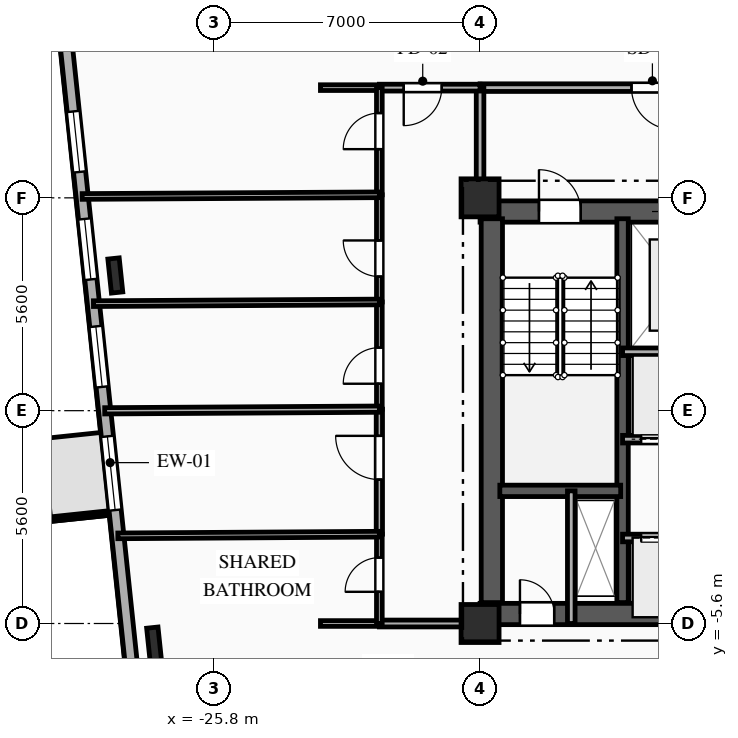
"""IFC4 building model, lengths in metres.
Left out: names, types, materials, properties, quantities, classifications, styles, units other than length and angle.
Written with IfcOpenShell. Run it as: python <this file> out.ifc"""

import sys

from ifc_helpers import new_model, si_unit, direction, frame, frame_2d, origin, origin_2d, place, context, subcontext, project, spatial, rectangle, i_section, extrude, element, fill, save


model = new_model("IFC4")
c1 = context("Model", 3, precision=1e-05, world=origin(), true_north=direction((0.0, 1.0)))
c2 = subcontext(c1, "Body", "Model", "MODEL_VIEW")
j1 = project(units=[si_unit("LENGTHUNIT", "METRE"), si_unit("PLANEANGLEUNIT", "RADIAN")], contexts=[c1])
p1 = place(None, origin())
s1 = spatial("IfcSite", under=j1, at=p1, CompositionType="ELEMENT")
p2 = place(p1, origin())
s2 = spatial("IfcBuilding", under=s1, at=p2, CompositionType="ELEMENT")
p3 = place(p2, frame((0.0, 0.0, 99.1)))
s3 = spatial("IfcBuildingStorey", under=s2, at=p3, CompositionType="ELEMENT", Elevation=99.1)
for number, where, z_axis, x_axis in (
    (1, (-18.8, -5.6, 0.0), (0.0, 0.0, 1.0), (1.0, 0.0, 0.0)),
    (2, (-18.8, 5.6, 0.0), (0.0, 0.0, 1.0), (1.0, 0.0, 0.0)),
):
    element("IfcColumn", number, at=place(p3, frame(where, z_axis=z_axis, x_axis=x_axis)), inside=s3, PredefinedType="COLUMN", context=c2, shape_type="SweptSolid", body=[
        extrude(rectangle(XDim=1.0, YDim=1.0, at=origin_2d()), origin(), (0.0, 0.0, 1.0), 3.35),
    ])
for number, where, z_axis, x_axis in (
    (3, (-28.398, 3.557, 0.0), (0.0, 0.0, 1.0), (0.995, 0.105, 0.0)),
    (4, (-27.377, -6.156, 0.0), (0.0, 0.0, 1.0), (0.995, 0.105, 0.0)),
):
    element("IfcColumn", number, at=place(p3, frame(where, z_axis=z_axis, x_axis=x_axis)), inside=s3, PredefinedType="COLUMN", context=c2, shape_type="SweptSolid", body=[
        extrude(i_section(OverallWidth=0.3, OverallDepth=0.9, WebThickness=0.019, FlangeThickness=0.035, FilletRadius=0.03, at=origin_2d()), origin(), (0.0, 0.0, 1.0), 3.35),
    ])
p4 = place(p3, frame((-26.935, -16.583, 0.0), z_axis=(0.0, 0.0, 1.0), x_axis=(-0.104524887486, 0.994522271192, 0.0)))
e5 = element("IfcWall", 5, at=p4, inside=s3, PredefinedType="SOLIDWALL", context=c2, shape_type="SweptSolid", body=[
    extrude(rectangle(XDim=30.6, YDim=0.32, at=frame_2d((15.3, 0.0))), origin(), (0.0, 0.0, 1.0), 3.045),
])
p5 = place(p4, frame((14.045, 0.0, 0.85)))
e6 = element("IfcOpeningElement", 6, at=p5, cuts=e5, PredefinedType="OPENING", context=c2, shape_type="SweptSolid", body=[
    extrude(rectangle(XDim=1.95, YDim=1.85, at=frame_2d((0.975, 0.925))), frame((0.0, 0.17, 0.0), z_axis=(0.0, -1.0, 0.0), x_axis=(1.0, 0.0, 0.0)), (0.0, 0.0, 1.0), 0.34),
])
p6 = place(p4, frame((17.304, 0.0, 0.85)))
e7 = element("IfcOpeningElement", 7, at=p6, cuts=e5, PredefinedType="OPENING", context=c2, shape_type="SweptSolid", body=[
    extrude(rectangle(XDim=1.6, YDim=1.85, at=frame_2d((0.8, 0.925))), frame((0.0, 0.17, 0.0), z_axis=(0.0, -1.0, 0.0), x_axis=(1.0, 0.0, 0.0)), (0.0, 0.0, 1.0), 0.34),
])
p7 = place(p4, frame((20.147, 0.0, 0.85)))
e8 = element("IfcOpeningElement", 8, at=p7, cuts=e5, PredefinedType="OPENING", context=c2, shape_type="SweptSolid", body=[
    extrude(rectangle(XDim=1.6, YDim=1.85, at=frame_2d((0.8, 0.925))), frame((0.0, 0.17, 0.0), z_axis=(0.0, -1.0, 0.0), x_axis=(1.0, 0.0, 0.0)), (0.0, 0.0, 1.0), 0.34),
])
p8 = place(p4, frame((22.991, 0.0, 0.85)))
e9 = element("IfcOpeningElement", 9, at=p8, cuts=e5, PredefinedType="OPENING", context=c2, shape_type="SweptSolid", body=[
    extrude(rectangle(XDim=1.6, YDim=1.85, at=frame_2d((0.8, 0.925))), frame((0.0, 0.17, 0.0), z_axis=(0.0, -1.0, 0.0), x_axis=(1.0, 0.0, 0.0)), (0.0, 0.0, 1.0), 0.34),
])
p9 = place(p3, frame((-18.8, 5.24, 0.0), z_axis=(0.0, 0.0, 1.0), x_axis=(1.0, 0.0, 0.0)))
e10 = element("IfcWall", 10, at=p9, inside=s3, PredefinedType="SHEAR", context=c2, shape_type="SweptSolid", body=[
    extrude(rectangle(XDim=9.6, YDim=0.56, at=frame_2d((4.8, 0.0))), origin(), (0.0, 0.0, 1.0), 3.045),
])
p10 = place(p9, frame((1.55, 0.0, 0.0)))
e11 = element("IfcOpeningElement", 11, at=p10, cuts=e10, PredefinedType="OPENING", context=c2, shape_type="SweptSolid", body=[
    extrude(rectangle(XDim=1.1, YDim=2.15, at=frame_2d((0.55, 1.075))), frame((0.0, 0.29, 0.0), z_axis=(0.0, -1.0, 0.0), x_axis=(1.0, 0.0, 0.0)), (0.0, 0.0, 1.0), 0.58),
])
p11 = place(p9, frame((4.775, 0.0, 0.0)))
e12 = element("IfcOpeningElement", 12, at=p11, cuts=e10, PredefinedType="OPENING", context=c2, shape_type="SweptSolid", body=[
    extrude(rectangle(XDim=1.05, YDim=2.1, at=frame_2d((0.525, 1.05))), frame((0.0, 0.29, 0.0), z_axis=(0.0, -1.0, 0.0), x_axis=(1.0, 0.0, 0.0)), (0.0, 0.0, 1.0), 0.58),
])
p12 = place(p3, frame((-18.8, -5.35, 0.0), z_axis=(0.0, 0.0, 1.0), x_axis=(1.0, 0.0, 0.0)))
e13 = element("IfcWall", 13, at=p12, inside=s3, PredefinedType="SHEAR", context=c2, shape_type="SweptSolid", body=[
    extrude(rectangle(XDim=9.6, YDim=0.56, at=frame_2d((4.8, 0.0))), origin(), (0.0, 0.0, 1.0), 3.045),
])
p13 = place(p12, frame((1.05, 0.0, 0.0)))
e14 = element("IfcOpeningElement", 14, at=p13, cuts=e13, PredefinedType="OPENING", context=c2, shape_type="SweptSolid", body=[
    extrude(rectangle(XDim=0.9, YDim=2.1, at=frame_2d((0.45, 1.05))), frame((0.0, 0.29, 0.0), z_axis=(0.0, -1.0, 0.0), x_axis=(1.0, 0.0, 0.0)), (0.0, 0.0, 1.0), 0.58),
])
p14 = place(p3, frame((-18.49, -5.05, 0.0), z_axis=(0.0, 0.0, 1.0), x_axis=(0.0, 1.0, 0.0)))
e15 = element("IfcWall", 15, at=p14, inside=s3, PredefinedType="SHEAR", context=c2, shape_type="SweptSolid", body=[
    extrude(rectangle(XDim=10.1, YDim=0.56, at=frame_2d((5.05, 0.0))), origin(), (0.0, 0.0, 1.0), 3.045),
])
p15 = place(p3, frame((-15.05, -5.05, 0.0), z_axis=(0.0, 0.0, 1.0), x_axis=(0.0, 1.0, 0.0)))
e16 = element("IfcWall", 16, at=p15, inside=s3, PredefinedType="SHEAR", context=c2, shape_type="SweptSolid", body=[
    extrude(rectangle(XDim=10.1, YDim=0.3, at=frame_2d((5.05, 0.0))), origin(), (0.0, 0.0, 1.0), 3.045),
])
p16 = place(p3, frame((-18.28, -2.11, 0.0), z_axis=(0.0, 0.0, 1.0), x_axis=(1.0, 0.0, 0.0)))
e17 = element("IfcWall", 17, at=p16, inside=s3, PredefinedType="SHEAR", context=c2, shape_type="SweptSolid", body=[
    extrude(rectangle(XDim=3.18, YDim=0.3, at=frame_2d((1.59, 0.0))), origin(), (0.0, 0.0, 1.0), 3.045),
])
p17 = place(p3, frame((-16.4, -5.6, 0.0), z_axis=(0.0, 0.0, 1.0), x_axis=(0.0, 1.0, 0.0)))
e18 = element("IfcWall", 18, at=p17, inside=s3, PredefinedType="PARTITIONING", context=c2, shape_type="SweptSolid", body=[
    extrude(rectangle(XDim=3.49, YDim=0.2, at=frame_2d((1.745, 0.0))), origin(), (0.0, 0.0, 1.0), 3.045),
])
p18 = place(p3, frame((-12.0, 8.5, 0.0), z_axis=(0.0, 0.0, 1.0), x_axis=(-1.0, 0.0, 0.0)))
e19 = element("IfcWall", 19, at=p18, inside=s3, PredefinedType="PARTITIONING", context=c2, shape_type="SweptSolid", body=[
    extrude(rectangle(XDim=6.8, YDim=0.2, at=frame_2d((3.4, 0.0))), origin(), (0.0, 0.0, 1.0), 3.045),
])
p19 = place(p18, frame((1.715, 0.0, 0.0)))
e20 = element("IfcOpeningElement", 20, at=p19, cuts=e19, PredefinedType="OPENING", context=c2, shape_type="SweptSolid", body=[
    extrude(rectangle(XDim=1.1, YDim=2.15, at=frame_2d((0.55, 1.075))), frame((0.0, 0.11, 0.0), z_axis=(0.0, -1.0, 0.0), x_axis=(1.0, 0.0, 0.0)), (0.0, 0.0, 1.0), 0.22),
])
p20 = place(p3, frame((-18.8, 8.5, 0.0), z_axis=(0.0, 0.0, 1.0), x_axis=(0.0, -1.0, 0.0)))
e21 = element("IfcWall", 21, at=p20, inside=s3, PredefinedType="PARTITIONING", context=c2, shape_type="SweptSolid", body=[
    extrude(rectangle(XDim=2.9, YDim=0.2, at=frame_2d((1.45, 0.0))), origin(), (0.0, 0.0, 1.0), 2.53),
])
p21 = place(p3, frame((-15.05, -3.35, 0.0), z_axis=(0.0, 0.0, 1.0), x_axis=(1.0, 0.0, 0.0)))
e22 = element("IfcWall", 22, at=p21, inside=s3, PredefinedType="PARTITIONING", context=c2, shape_type="SweptSolid", body=[
    extrude(rectangle(XDim=2.03, YDim=0.2, at=frame_2d((1.015, 0.0))), origin(), (0.0, 0.0, 1.0), 3.045),
])
p22 = place(p21, frame((0.49, 0.0, 0.0)))
e23 = element("IfcOpeningElement", 23, at=p22, cuts=e22, PredefinedType="OPENING", context=c2, shape_type="SweptSolid", body=[
    extrude(rectangle(XDim=1.05, YDim=2.1, at=frame_2d((0.525, 1.05))), frame((0.0, 0.11, 0.0), z_axis=(0.0, -1.0, 0.0), x_axis=(1.0, 0.0, 0.0)), (0.0, 0.0, 1.0), 0.22),
])
p23 = place(p3, frame((-13.02, -0.75, 0.0), z_axis=(0.0, 0.0, 1.0), x_axis=(-1.0, 0.0, 0.0)))
e24 = element("IfcWall", 24, at=p23, inside=s3, PredefinedType="PARTITIONING", context=c2, shape_type="SweptSolid", body=[
    extrude(rectangle(XDim=2.03, YDim=0.2, at=frame_2d((1.015, 0.0))), origin(), (0.0, 0.0, 1.0), 3.045),
])
p24 = place(p23, frame((0.49, 0.0, 0.0)))
e25 = element("IfcOpeningElement", 25, at=p24, cuts=e24, PredefinedType="OPENING", context=c2, shape_type="SweptSolid", body=[
    extrude(rectangle(XDim=1.05, YDim=2.1, at=frame_2d((0.525, 1.05))), frame((0.0, 0.11, 0.0), z_axis=(0.0, -1.0, 0.0), x_axis=(1.0, 0.0, 0.0)), (0.0, 0.0, 1.0), 0.22),
])
p25 = place(p3, frame((-18.8, 8.5, 0.0), z_axis=(0.0, 0.0, 1.0), x_axis=(-1.0, 0.0, 0.0)))
e26 = element("IfcWall", 26, at=p25, inside=s3, PredefinedType="PARTITIONING", context=c2, shape_type="SweptSolid", body=[
    extrude(rectangle(XDim=2.65, YDim=0.18, at=frame_2d((1.325, 0.0))), origin(), (0.0, 0.0, 1.0), 3.045),
])
p26 = place(p25, frame((1.009, 0.0, 0.0)))
e27 = element("IfcOpeningElement", 27, at=p26, cuts=e26, PredefinedType="OPENING", context=c2, shape_type="SweptSolid", body=[
    extrude(rectangle(XDim=1.0, YDim=2.15, at=frame_2d((0.5, 1.075))), frame((0.0, 0.1, 0.0), z_axis=(0.0, -1.0, 0.0), x_axis=(1.0, 0.0, 0.0)), (0.0, 0.0, 1.0), 0.2),
])
p27 = place(p3, frame((-21.45, 8.5, 0.0), z_axis=(0.0, 0.0, 1.0), x_axis=(-1.0, 0.0, 0.0)))
e28 = element("IfcWall", 28, at=p27, inside=s3, PredefinedType="PARTITIONING", context=c2, shape_type="SweptSolid", body=[
    extrude(rectangle(XDim=1.55, YDim=0.15, at=frame_2d((0.775, 0.0))), origin(), (0.0, 0.0, 1.0), 3.045),
])
p28 = place(p3, frame((-21.45, -5.6, 0.0), z_axis=(0.0, 0.0, 1.0), x_axis=(1.0, 0.0, 0.0)))
e29 = element("IfcWall", 29, at=p28, inside=s3, PredefinedType="PARTITIONING", context=c2, shape_type="SweptSolid", body=[
    extrude(rectangle(XDim=2.65, YDim=0.18, at=frame_2d((1.325, 0.0))), origin(), (0.0, 0.0, 1.0), 3.045),
])
p29 = place(p3, frame((-23.0, -5.6, 0.0), z_axis=(0.0, 0.0, 1.0), x_axis=(1.0, 0.0, 0.0)))
e30 = element("IfcWall", 30, at=p29, inside=s3, PredefinedType="PLUMBINGWALL", context=c2, shape_type="SweptSolid", body=[
    extrude(rectangle(XDim=1.55, YDim=0.15, at=frame_2d((0.775, 0.0))), origin(), (0.0, 0.0, 1.0), 3.045),
])
p30 = place(p3, frame((-21.45, -5.6, 0.0), z_axis=(0.0, 0.0, 1.0), x_axis=(0.0, 1.0, 0.0)))
e31 = element("IfcWall", 31, at=p30, inside=s3, PredefinedType="PLUMBINGWALL", context=c2, shape_type="SweptSolid", body=[
    extrude(rectangle(XDim=2.35, YDim=0.15, at=frame_2d((1.175, 0.0))), origin(), (0.0, 0.0, 1.0), 3.045),
])
p31 = place(p30, frame((0.834, 0.0, 0.0)))
e32 = element("IfcOpeningElement", 32, at=p31, cuts=e31, PredefinedType="OPENING", context=c2, shape_type="SweptSolid", body=[
    extrude(rectangle(XDim=0.9, YDim=2.1, at=frame_2d((0.45, 1.05))), frame((0.0, 0.085, 0.0), z_axis=(0.0, -1.0, 0.0), x_axis=(1.0, 0.0, 0.0)), (0.0, 0.0, 1.0), 0.17),
])
p32 = place(p3, frame((-21.45, -3.25, 0.0), z_axis=(0.0, 0.0, 1.0), x_axis=(0.0, 1.0, 0.0)))
e33 = element("IfcWall", 33, at=p32, inside=s3, PredefinedType="PARTITIONING", context=c2, shape_type="SweptSolid", body=[
    extrude(rectangle(XDim=3.29, YDim=0.165, at=frame_2d((1.645, 0.0))), origin(), (0.0, 0.0, 1.0), 3.045),
])
p33 = place(p32, frame((1.438, 0.0, 0.0)))
e34 = element("IfcOpeningElement", 34, at=p33, cuts=e33, PredefinedType="OPENING", context=c2, shape_type="SweptSolid", body=[
    extrude(rectangle(XDim=1.15, YDim=2.15, at=frame_2d((0.575, 1.075))), frame((0.0, 0.093, 0.0), z_axis=(0.0, -1.0, 0.0), x_axis=(1.0, 0.0, 0.0)), (0.0, 0.0, 1.0), 0.185),
])
p34 = place(p3, frame((-21.45, 0.04, 0.0), z_axis=(0.0, 0.0, 1.0), x_axis=(0.0, 1.0, 0.0)))
e35 = element("IfcWall", 35, at=p34, inside=s3, PredefinedType="PARTITIONING", context=c2, shape_type="SweptSolid", body=[
    extrude(rectangle(XDim=2.82, YDim=0.15, at=frame_2d((1.41, 0.0))), origin(), (0.0, 0.0, 1.0), 3.045),
])
p35 = place(p34, frame((0.669, 0.0, 0.0)))
e36 = element("IfcOpeningElement", 36, at=p35, cuts=e35, PredefinedType="OPENING", context=c2, shape_type="SweptSolid", body=[
    extrude(rectangle(XDim=0.95, YDim=2.1, at=frame_2d((0.475, 1.05))), frame((0.0, 0.085, 0.0), z_axis=(0.0, -1.0, 0.0), x_axis=(1.0, 0.0, 0.0)), (0.0, 0.0, 1.0), 0.17),
])
p36 = place(p3, frame((-21.45, 2.86, 0.0), z_axis=(0.0, 0.0, 1.0), x_axis=(0.0, 1.0, 0.0)))
e37 = element("IfcWall", 37, at=p36, inside=s3, PredefinedType="PARTITIONING", context=c2, shape_type="SweptSolid", body=[
    extrude(rectangle(XDim=2.82, YDim=0.15, at=frame_2d((1.41, 0.0))), origin(), (0.0, 0.0, 1.0), 3.045),
])
p37 = place(p36, frame((0.669, 0.0, 0.0)))
e38 = element("IfcOpeningElement", 38, at=p37, cuts=e37, PredefinedType="OPENING", context=c2, shape_type="SweptSolid", body=[
    extrude(rectangle(XDim=0.95, YDim=2.1, at=frame_2d((0.475, 1.05))), frame((0.0, 0.085, 0.0), z_axis=(0.0, -1.0, 0.0), x_axis=(1.0, 0.0, 0.0)), (0.0, 0.0, 1.0), 0.17),
])
p38 = place(p3, frame((-21.45, 5.68, 0.0), z_axis=(0.0, 0.0, 1.0), x_axis=(0.0, 1.0, 0.0)))
e39 = element("IfcWall", 39, at=p38, inside=s3, PredefinedType="PARTITIONING", context=c2, shape_type="SweptSolid", body=[
    extrude(rectangle(XDim=2.82, YDim=0.15, at=frame_2d((1.41, 0.0))), origin(), (0.0, 0.0, 1.0), 3.045),
])
p39 = place(p38, frame((1.201, 0.0, 0.0)))
e40 = element("IfcOpeningElement", 40, at=p39, cuts=e39, PredefinedType="OPENING", context=c2, shape_type="SweptSolid", body=[
    extrude(rectangle(XDim=0.95, YDim=2.1, at=frame_2d((0.475, 1.05))), frame((0.0, 0.085, 0.0), z_axis=(0.0, -1.0, 0.0), x_axis=(1.0, 0.0, 0.0)), (0.0, 0.0, 1.0), 0.17),
])
p40 = place(p3, frame((-28.332, -3.294, 0.0), z_axis=(0.0, 0.0, 1.0), x_axis=(0.99997961062, 0.006385792383, 0.0)))
e41 = element("IfcWall", 41, at=p40, inside=s3, PredefinedType="PLUMBINGWALL", context=c2, shape_type="SweptSolid", body=[
    extrude(rectangle(XDim=6.882, YDim=0.15, at=frame_2d((3.441, 0.0))), origin(), (0.0, 0.0, 1.0), 3.045),
])
p41 = place(p3, frame((-28.677, -0.004, 0.0), z_axis=(0.0, 0.0, 1.0), x_axis=(0.999981514486, 0.006080352417, 0.0)))
e42 = element("IfcWall", 42, at=p41, inside=s3, PredefinedType="PARTITIONING", context=c2, shape_type="SweptSolid", body=[
    extrude(rectangle(XDim=7.228, YDim=0.165, at=frame_2d((3.614, 0.0))), origin(), (0.0, 0.0, 1.0), 3.045),
])
p42 = place(p3, frame((-28.974, 2.816, 0.0), z_axis=(0.0, 0.0, 1.0), x_axis=(0.999982942193, 0.00584083232, 0.0)))
e43 = element("IfcWall", 43, at=p42, inside=s3, PredefinedType="PARTITIONING", context=c2, shape_type="SweptSolid", body=[
    extrude(rectangle(XDim=7.524, YDim=0.15, at=frame_2d((3.762, 0.0))), origin(), (0.0, 0.0, 1.0), 2.53),
])
p43 = place(p3, frame((-29.27, 5.636, 0.0), z_axis=(0.0, 0.0, 1.0), x_axis=(0.999984210669, 0.005619467326, 0.0)))
e44 = element("IfcWall", 44, at=p43, inside=s3, PredefinedType="PARTITIONING", context=c2, shape_type="SweptSolid", body=[
    extrude(rectangle(XDim=7.82, YDim=0.15, at=frame_2d((3.91, 0.0))), origin(), (0.0, 0.0, 1.0), 3.045),
])
p44 = place(p3, frame((-15.05, 1.55, 0.0), z_axis=(0.0, 0.0, 1.0), x_axis=(1.0, 0.0, 0.0)))
e45 = element("IfcWall", 45, at=p44, inside=s3, PredefinedType="PARTITIONING", context=c2, shape_type="SweptSolid", body=[
    extrude(rectangle(XDim=5.85, YDim=0.2, at=frame_2d((2.925, 0.0))), origin(), (0.0, 0.0, 1.0), 3.045),
])
p45 = place(p5, origin())
e46 = element("IfcWindow", 46, at=p45, inside=s3, PartitioningType="SINGLE_PANEL", PredefinedType="WINDOW", context=c2, shape_type="SweptSolid", body=[
    extrude(rectangle(XDim=1.95, YDim=1.85, at=frame_2d((0.975, 0.925))), frame((0.0, 0.03, 0.0), z_axis=(0.0, -1.0, 0.0), x_axis=(1.0, 0.0, 0.0)), (0.0, 0.0, 1.0), 0.06),
])
fill(e6, e46)
p46 = place(p6, origin())
e47 = element("IfcWindow", 47, at=p46, inside=s3, PartitioningType="SINGLE_PANEL", PredefinedType="WINDOW", context=c2, shape_type="SweptSolid", body=[
    extrude(rectangle(XDim=1.6, YDim=1.85, at=frame_2d((0.8, 0.925))), frame((0.0, 0.03, 0.0), z_axis=(0.0, -1.0, 0.0), x_axis=(1.0, 0.0, 0.0)), (0.0, 0.0, 1.0), 0.06),
])
fill(e7, e47)
p47 = place(p7, origin())
e48 = element("IfcWindow", 48, at=p47, inside=s3, PartitioningType="SINGLE_PANEL", PredefinedType="WINDOW", context=c2, shape_type="SweptSolid", body=[
    extrude(rectangle(XDim=1.6, YDim=1.85, at=frame_2d((0.8, 0.925))), frame((0.0, 0.03, 0.0), z_axis=(0.0, -1.0, 0.0), x_axis=(1.0, 0.0, 0.0)), (0.0, 0.0, 1.0), 0.06),
])
fill(e8, e48)
p48 = place(p8, origin())
e49 = element("IfcWindow", 49, at=p48, inside=s3, PartitioningType="SINGLE_PANEL", PredefinedType="WINDOW", context=c2, shape_type="SweptSolid", body=[
    extrude(rectangle(XDim=1.6, YDim=1.85, at=frame_2d((0.8, 0.925))), frame((0.0, 0.03, 0.0), z_axis=(0.0, -1.0, 0.0), x_axis=(1.0, 0.0, 0.0)), (0.0, 0.0, 1.0), 0.06),
])
fill(e9, e49)
p49 = place(p10, origin())
e50 = element("IfcDoor", 50, at=p49, inside=s3, OperationType="SINGLE_SWING_LEFT", PredefinedType="DOOR", context=c2, shape_type="SweptSolid", body=[
    extrude(rectangle(XDim=1.1, YDim=2.15, at=frame_2d((0.55, 1.075))), frame((0.0, 0.025, 0.0), z_axis=(0.0, -1.0, 0.0), x_axis=(1.0, 0.0, 0.0)), (0.0, 0.0, 1.0), 0.05),
])
fill(e11, e50)
p50 = place(p13, origin())
e51 = element("IfcDoor", 51, at=p50, inside=s3, OperationType="SINGLE_SWING_LEFT", PredefinedType="DOOR", context=c2, shape_type="SweptSolid", body=[
    extrude(rectangle(XDim=0.9, YDim=2.1, at=frame_2d((0.45, 1.05))), frame((0.0, 0.025, 0.0), z_axis=(0.0, -1.0, 0.0), x_axis=(1.0, 0.0, 0.0)), (0.0, 0.0, 1.0), 0.05),
])
fill(e14, e51)
p51 = place(p19, origin())
e52 = element("IfcDoor", 52, at=p51, inside=s3, OperationType="SINGLE_SWING_LEFT", PredefinedType="DOOR", context=c2, shape_type="SweptSolid", body=[
    extrude(rectangle(XDim=1.1, YDim=2.15, at=frame_2d((0.55, 1.075))), frame((0.0, 0.025, 0.0), z_axis=(0.0, -1.0, 0.0), x_axis=(1.0, 0.0, 0.0)), (0.0, 0.0, 1.0), 0.05),
])
fill(e20, e52)
p52 = place(p22, origin())
e53 = element("IfcDoor", 53, at=p52, inside=s3, OperationType="DOUBLE_DOOR_SLIDING", PredefinedType="DOOR", context=c2, shape_type="SweptSolid", body=[
    extrude(rectangle(XDim=1.05, YDim=2.1, at=frame_2d((0.525, 1.05))), frame((0.0, 0.025, 0.0), z_axis=(0.0, -1.0, 0.0), x_axis=(1.0, 0.0, 0.0)), (0.0, 0.0, 1.0), 0.05),
])
fill(e23, e53)
p53 = place(p24, origin())
e54 = element("IfcDoor", 54, at=p53, inside=s3, OperationType="DOUBLE_DOOR_SLIDING", PredefinedType="DOOR", context=c2, shape_type="SweptSolid", body=[
    extrude(rectangle(XDim=1.05, YDim=2.1, at=frame_2d((0.525, 1.05))), frame((0.0, 0.025, 0.0), z_axis=(0.0, -1.0, 0.0), x_axis=(1.0, 0.0, 0.0)), (0.0, 0.0, 1.0), 0.05),
])
fill(e25, e54)
p54 = place(p26, origin())
e55 = element("IfcDoor", 55, at=p54, inside=s3, OperationType="SINGLE_SWING_RIGHT", PredefinedType="DOOR", context=c2, shape_type="SweptSolid", body=[
    extrude(rectangle(XDim=1.0, YDim=2.15, at=frame_2d((0.5, 1.075))), frame((0.0, 0.025, 0.0), z_axis=(0.0, -1.0, 0.0), x_axis=(1.0, 0.0, 0.0)), (0.0, 0.0, 1.0), 0.05),
])
fill(e27, e55)
p55 = place(p31, origin())
e56 = element("IfcDoor", 56, at=p55, inside=s3, OperationType="SINGLE_SWING_LEFT", PredefinedType="DOOR", context=c2, shape_type="SweptSolid", body=[
    extrude(rectangle(XDim=0.9, YDim=2.1, at=frame_2d((0.45, 1.05))), frame((0.0, 0.025, 0.0), z_axis=(0.0, -1.0, 0.0), x_axis=(1.0, 0.0, 0.0)), (0.0, 0.0, 1.0), 0.05),
])
fill(e32, e56)
p56 = place(p33, origin())
e57 = element("IfcDoor", 57, at=p56, inside=s3, OperationType="SINGLE_SWING_RIGHT", PredefinedType="DOOR", context=c2, shape_type="SweptSolid", body=[
    extrude(rectangle(XDim=1.15, YDim=2.15, at=frame_2d((0.575, 1.075))), frame((0.0, 0.025, 0.0), z_axis=(0.0, -1.0, 0.0), x_axis=(1.0, 0.0, 0.0)), (0.0, 0.0, 1.0), 0.05),
])
fill(e34, e57)
p57 = place(p35, origin())
e58 = element("IfcDoor", 58, at=p57, inside=s3, OperationType="SINGLE_SWING_LEFT", PredefinedType="DOOR", context=c2, shape_type="SweptSolid", body=[
    extrude(rectangle(XDim=0.95, YDim=2.1, at=frame_2d((0.475, 1.05))), frame((0.0, 0.025, 0.0), z_axis=(0.0, -1.0, 0.0), x_axis=(1.0, 0.0, 0.0)), (0.0, 0.0, 1.0), 0.05),
])
fill(e36, e58)
p58 = place(p37, origin())
e59 = element("IfcDoor", 59, at=p58, inside=s3, OperationType="SINGLE_SWING_RIGHT", PredefinedType="DOOR", context=c2, shape_type="SweptSolid", body=[
    extrude(rectangle(XDim=0.95, YDim=2.1, at=frame_2d((0.475, 1.05))), frame((0.0, 0.025, 0.0), z_axis=(0.0, -1.0, 0.0), x_axis=(1.0, 0.0, 0.0)), (0.0, 0.0, 1.0), 0.05),
])
fill(e38, e59)
p59 = place(p39, origin())
e60 = element("IfcDoor", 60, at=p59, inside=s3, OperationType="SINGLE_SWING_LEFT", PredefinedType="DOOR", context=c2, shape_type="SweptSolid", body=[
    extrude(rectangle(XDim=0.95, YDim=2.1, at=frame_2d((0.475, 1.05))), frame((0.0, 0.025, 0.0), z_axis=(0.0, -1.0, 0.0), x_axis=(1.0, 0.0, 0.0)), (0.0, 0.0, 1.0), 0.05),
])
fill(e40, e60)
save(model, sys.argv[1])
